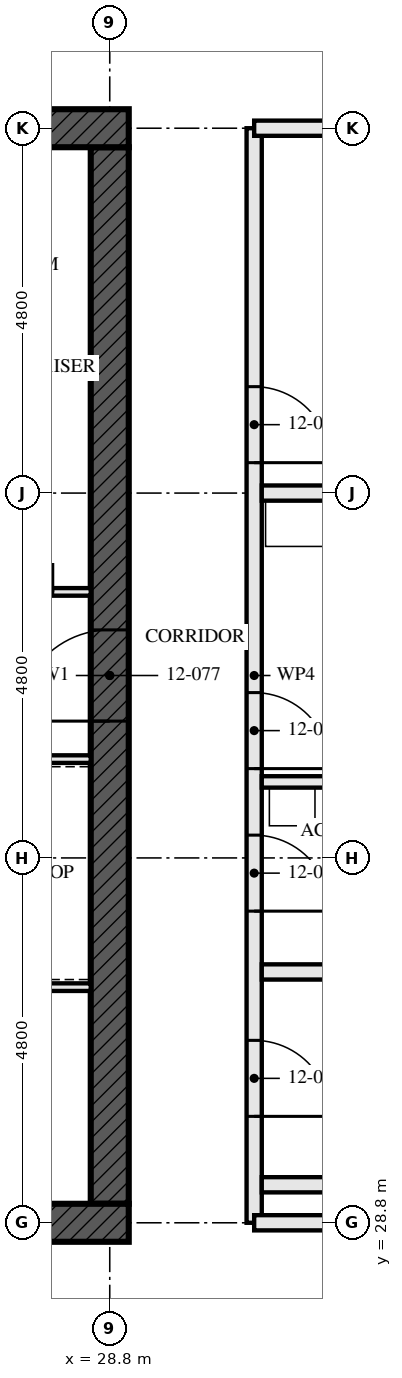
"""IFC4 building model, lengths in metres.
Left out: names, types, materials, properties, quantities, classifications, styles, units other than length and angle.
Written with IfcOpenShell. Run it as: python <this file> out.ifc"""

import sys

from ifc_helpers import new_model, si_unit, direction, frame, frame_2d, origin, place, context, subcontext, project, spatial, rectangle, extrude, element, fill, save


model = new_model("IFC4")
c1 = context("Model", 3, precision=1e-05, world=origin(), true_north=direction((0.0, 1.0)))
c2 = subcontext(c1, "Body", "Model", "MODEL_VIEW")
j1 = project(units=[si_unit("LENGTHUNIT", "METRE"), si_unit("PLANEANGLEUNIT", "RADIAN")], contexts=[c1])
p1 = place(None, origin())
s1 = spatial("IfcSite", under=j1, at=p1, CompositionType="ELEMENT")
p2 = place(p1, origin())
s2 = spatial("IfcBuilding", under=s1, at=p2, CompositionType="ELEMENT")
p3 = place(p2, frame((0.0, 0.0, 48.0)))
s3 = spatial("IfcBuildingStorey", under=s2, at=p3, CompositionType="ELEMENT", Elevation=48.0)
p4 = place(p3, frame((14.15, 28.8, -0.17), z_axis=(0.0, 0.0, 1.0), x_axis=(1.0, 0.0, 0.0)))
e1 = element("IfcWall", 1, at=p4, inside=s3, PredefinedType="SHEAR", context=c2, shape_type="SweptSolid", body=[
    extrude(rectangle(XDim=14.9, YDim=0.5, at=frame_2d((7.45, 0.0))), origin(), (0.0, 0.0, 1.0), 3.5),
])
p5 = place(p4, frame((6.85, 0.0, 0.17)))
e2 = element("IfcOpeningElement", 2, at=p5, cuts=e1, PredefinedType="OPENING", context=c2, shape_type="SweptSolid", body=[
    extrude(rectangle(XDim=1.2, YDim=2.1, at=frame_2d((0.6, 1.05))), frame((0.0, 0.26, 0.0), z_axis=(0.0, -1.0, 0.0), x_axis=(1.0, 0.0, 0.0)), (0.0, 0.0, 1.0), 0.521),
])
p6 = place(p3, frame((29.05, 43.2, -0.17), z_axis=(0.0, 0.0, 1.0), x_axis=(-1.0, 0.0, 0.0)))
e3 = element("IfcWall", 3, at=p6, inside=s3, PredefinedType="SHEAR", context=c2, shape_type="SweptSolid", body=[
    extrude(rectangle(XDim=14.9, YDim=0.5, at=frame_2d((7.45, 0.0))), origin(), (0.0, 0.0, 1.0), 3.5),
])
p7 = place(p6, frame((6.85, 0.0, 0.17)))
e4 = element("IfcOpeningElement", 4, at=p7, cuts=e3, PredefinedType="OPENING", context=c2, shape_type="SweptSolid", body=[
    extrude(rectangle(XDim=1.2, YDim=2.1, at=frame_2d((0.6, 1.05))), frame((0.0, 0.26, 0.0), z_axis=(0.0, -1.0, 0.0), x_axis=(1.0, 0.0, 0.0)), (0.0, 0.0, 1.0), 0.521),
])
p8 = place(p3, frame((28.8, 29.05, -0.17), z_axis=(0.0, 0.0, 1.0), x_axis=(0.0, 1.0, 0.0)))
e5 = element("IfcWall", 5, at=p8, inside=s3, PredefinedType="SHEAR", context=c2, shape_type="SweptSolid", body=[
    extrude(rectangle(XDim=13.9, YDim=0.5, at=frame_2d((6.95, 0.0))), origin(), (0.0, 0.0, 1.0), 3.5),
])
p9 = place(p8, frame((6.35, 0.0, 0.17)))
e6 = element("IfcOpeningElement", 6, at=p9, cuts=e5, PredefinedType="OPENING", context=c2, shape_type="SweptSolid", body=[
    extrude(rectangle(XDim=1.2, YDim=2.1, at=frame_2d((0.6, 1.05))), frame((0.0, 0.26, 0.0), z_axis=(0.0, -1.0, 0.0), x_axis=(1.0, 0.0, 0.0)), (0.0, 0.0, 1.0), 0.521),
])
for number, where, z_axis, x_axis in (
    (7, (35.5, 29.3, 0.0), (0.0, 0.0, 1.0), (-1.0, 0.0, 0.0)),
    (8, (35.5, 32.1, 0.0), (0.0, 0.0, 1.0), (-1.0, 0.0, 0.0)),
):
    element("IfcWall", number, at=place(p3, frame(where, z_axis=z_axis, x_axis=x_axis)), inside=s3, PredefinedType="SOLIDWALL", context=c2, shape_type="SweptSolid", body=[
        extrude(rectangle(XDim=4.7, YDim=0.2, at=frame_2d((2.35, 0.0))), origin(), (0.0, 0.0, 1.0), 2.99),
    ])
p10 = place(p3, frame((33.8, 34.6, 0.0), z_axis=(0.0, 0.0, 1.0), x_axis=(-1.0, 0.0, 0.0)))
e9 = element("IfcWall", 9, at=p10, inside=s3, PredefinedType="PARTITIONING", context=c2, shape_type="SweptSolid", body=[
    extrude(rectangle(XDim=3.0, YDim=0.15, at=frame_2d((1.5, 0.0))), origin(), (0.0, 0.0, 1.0), 3.33),
])
p11 = place(p3, frame((42.805, 38.4, 0.0), z_axis=(0.0, 0.0, 1.0), x_axis=(-1.0, 0.0, 0.0)))
e10 = element("IfcWall", 10, at=p11, inside=s3, PredefinedType="PARTITIONING", context=c2, shape_type="SweptSolid", body=[
    extrude(rectangle(XDim=12.005, YDim=0.2, at=frame_2d((6.002, 0.0))), origin(), (0.0, 0.0, 1.0), 2.55),
])
p12 = place(p3, frame((30.7, 28.8, 0.0), z_axis=(0.0, 0.0, 1.0), x_axis=(0.0, 1.0, 0.0)))
e11 = element("IfcWall", 11, at=p12, inside=s3, PredefinedType="PARTITIONING", context=c2, shape_type="SweptSolid", body=[
    extrude(rectangle(XDim=14.4, YDim=0.2, at=frame_2d((7.2, 0.0))), origin(), (0.0, 0.0, 1.0), 2.55),
])
p13 = place(p12, frame((1.4, 0.0, 0.0)))
e12 = element("IfcOpeningElement", 12, at=p13, cuts=e11, PredefinedType="OPENING", context=c2, shape_type="SweptSolid", body=[
    extrude(rectangle(XDim=1.0, YDim=2.1, at=frame_2d((0.5, 1.05))), frame((0.0, 0.111, 0.0), z_axis=(0.0, -1.0, 0.0), x_axis=(1.0, 0.0, 0.0)), (0.0, 0.0, 1.0), 0.221),
])
p14 = place(p12, frame((4.1, 0.0, 0.0)))
e13 = element("IfcOpeningElement", 13, at=p14, cuts=e11, PredefinedType="OPENING", context=c2, shape_type="SweptSolid", body=[
    extrude(rectangle(XDim=1.0, YDim=2.1, at=frame_2d((0.5, 1.05))), frame((0.0, 0.111, 0.0), z_axis=(0.0, -1.0, 0.0), x_axis=(1.0, 0.0, 0.0)), (0.0, 0.0, 1.0), 0.221),
])
p15 = place(p12, frame((5.975, 0.0, 0.0)))
e14 = element("IfcOpeningElement", 14, at=p15, cuts=e11, PredefinedType="OPENING", context=c2, shape_type="SweptSolid", body=[
    extrude(rectangle(XDim=1.0, YDim=2.1, at=frame_2d((0.5, 1.05))), frame((0.0, 0.111, 0.0), z_axis=(0.0, -1.0, 0.0), x_axis=(1.0, 0.0, 0.0)), (0.0, 0.0, 1.0), 0.221),
])
p16 = place(p12, frame((10.0, 0.0, 0.0)))
e15 = element("IfcOpeningElement", 15, at=p16, cuts=e11, PredefinedType="OPENING", context=c2, shape_type="SweptSolid", body=[
    extrude(rectangle(XDim=1.0, YDim=2.1, at=frame_2d((0.5, 1.05))), frame((0.0, 0.111, 0.0), z_axis=(0.0, -1.0, 0.0), x_axis=(1.0, 0.0, 0.0)), (0.0, 0.0, 1.0), 0.221),
])
p17 = place(p3, frame((23.05, 34.9, 0.0), z_axis=(0.0, 0.0, 1.0), x_axis=(1.0, 0.0, 0.0)))
e16 = element("IfcWall", 16, at=p17, inside=s3, PredefinedType="SOLIDWALL", context=c2, shape_type="SweptSolid", body=[
    extrude(rectangle(XDim=5.5, YDim=0.1, at=frame_2d((2.75, 0.0))), origin(), (0.0, 0.0, 1.0), 3.33),
])
p18 = place(p3, frame((22.65, 37.1, 0.0), z_axis=(0.0, 0.0, 1.0), x_axis=(1.0, 0.0, 0.0)))
e17 = element("IfcWall", 17, at=p18, inside=s3, PredefinedType="SOLIDWALL", context=c2, shape_type="SweptSolid", body=[
    extrude(rectangle(XDim=5.9, YDim=0.1, at=frame_2d((2.95, 0.0))), origin(), (0.0, 0.0, 1.0), 3.33),
])
p19 = place(p18, frame((3.15, 0.0, 0.0)))
e18 = element("IfcOpeningElement", 18, at=p19, cuts=e17, PredefinedType="OPENING", context=c2, shape_type="SweptSolid", body=[
    extrude(rectangle(XDim=0.9, YDim=2.1, at=frame_2d((0.45, 1.05))), frame((0.0, 0.061, 0.0), z_axis=(0.0, -1.0, 0.0), x_axis=(1.0, 0.0, 0.0)), (0.0, 0.0, 1.0), 0.121),
])
p20 = place(p18, frame((4.7, 0.0, 0.0)))
e19 = element("IfcOpeningElement", 19, at=p20, cuts=e17, PredefinedType="OPENING", context=c2, shape_type="SweptSolid", body=[
    extrude(rectangle(XDim=0.7, YDim=2.1, at=frame_2d((0.35, 1.05))), frame((0.0, 0.061, 0.0), z_axis=(0.0, -1.0, 0.0), x_axis=(1.0, 0.0, 0.0)), (0.0, 0.0, 1.0), 0.121),
])
p21 = place(p3, frame((23.15, 31.9, 0.0), z_axis=(0.0, 0.0, 1.0), x_axis=(1.0, 0.0, 0.0)))
e20 = element("IfcWall", 20, at=p21, inside=s3, PredefinedType="SOLIDWALL", context=c2, shape_type="SweptSolid", body=[
    extrude(rectangle(XDim=5.4, YDim=0.1, at=frame_2d((2.7, 0.0))), origin(), (0.0, 0.0, 1.0), 3.33),
])
for number, where, z_axis, x_axis in (
    (21, (33.205, 28.8, 0.0), (0.0, 0.0, 1.0), (-1.0, 0.0, 0.0)),
    (22, (33.205, 43.2, 0.0), (0.0, 0.0, 1.0), (-1.0, 0.0, 0.0)),
):
    element("IfcWall", number, at=place(p3, frame(where, z_axis=z_axis, x_axis=x_axis)), inside=s3, PredefinedType="PARTITIONING", context=c2, shape_type="SweptSolid", body=[
        extrude(rectangle(XDim=2.505, YDim=0.2, at=frame_2d((1.252, 0.0))), origin(), (0.0, 0.0, 1.0), 2.32),
    ])
p22 = place(p13, frame((1.0, 0.0, 0.0), z_axis=(0.0, 0.0, 1.0), x_axis=(-1.0, 0.0, 0.0)))
e23 = element("IfcDoor", 23, at=p22, inside=s3, OperationType="SINGLE_SWING_LEFT", PredefinedType="DOOR", context=c2, shape_type="SweptSolid", body=[
    extrude(rectangle(XDim=1.0, YDim=2.1, at=frame_2d((0.5, 1.05))), frame((0.0, 0.032, 0.0), z_axis=(0.0, -1.0, 0.0), x_axis=(1.0, 0.0, 0.0)), (0.0, 0.0, 1.0), 0.064),
])
fill(e12, e23)
p23 = place(p14, frame((1.0, 0.0, 0.0), z_axis=(0.0, 0.0, 1.0), x_axis=(-1.0, 0.0, 0.0)))
e24 = element("IfcDoor", 24, at=p23, inside=s3, OperationType="SINGLE_SWING_LEFT", PredefinedType="DOOR", context=c2, shape_type="SweptSolid", body=[
    extrude(rectangle(XDim=1.0, YDim=2.1, at=frame_2d((0.5, 1.05))), frame((0.0, 0.027, 0.0), z_axis=(0.0, -1.0, 0.0), x_axis=(1.0, 0.0, 0.0)), (0.0, 0.0, 1.0), 0.054),
])
fill(e13, e24)
p24 = place(p15, frame((1.0, 0.0, 0.0), z_axis=(0.0, 0.0, 1.0), x_axis=(-1.0, 0.0, 0.0)))
e25 = element("IfcDoor", 25, at=p24, inside=s3, OperationType="SINGLE_SWING_LEFT", PredefinedType="DOOR", context=c2, shape_type="SweptSolid", body=[
    extrude(rectangle(XDim=1.0, YDim=2.1, at=frame_2d((0.5, 1.05))), frame((0.0, 0.027, 0.0), z_axis=(0.0, -1.0, 0.0), x_axis=(1.0, 0.0, 0.0)), (0.0, 0.0, 1.0), 0.054),
])
fill(e14, e25)
p25 = place(p16, frame((1.0, 0.0, 0.0), z_axis=(0.0, 0.0, 1.0), x_axis=(-1.0, 0.0, 0.0)))
e26 = element("IfcDoor", 26, at=p25, inside=s3, OperationType="SINGLE_SWING_LEFT", PredefinedType="DOOR", context=c2, shape_type="SweptSolid", body=[
    extrude(rectangle(XDim=1.0, YDim=2.1, at=frame_2d((0.5, 1.05))), frame((0.0, 0.027, 0.0), z_axis=(0.0, -1.0, 0.0), x_axis=(1.0, 0.0, 0.0)), (0.0, 0.0, 1.0), 0.054),
])
fill(e15, e26)
p26 = place(p9, origin())
e27 = element("IfcDoor", 27, at=p26, inside=s3, OperationType="SINGLE_SWING_LEFT", PredefinedType="DOOR", context=c2, shape_type="SweptSolid", body=[
    extrude(rectangle(XDim=1.2, YDim=2.1, at=frame_2d((0.6, 1.05))), frame((0.0, 0.027, 0.0), z_axis=(0.0, -1.0, 0.0), x_axis=(1.0, 0.0, 0.0)), (0.0, 0.0, 1.0), 0.054),
])
fill(e6, e27)
save(model, sys.argv[1])
